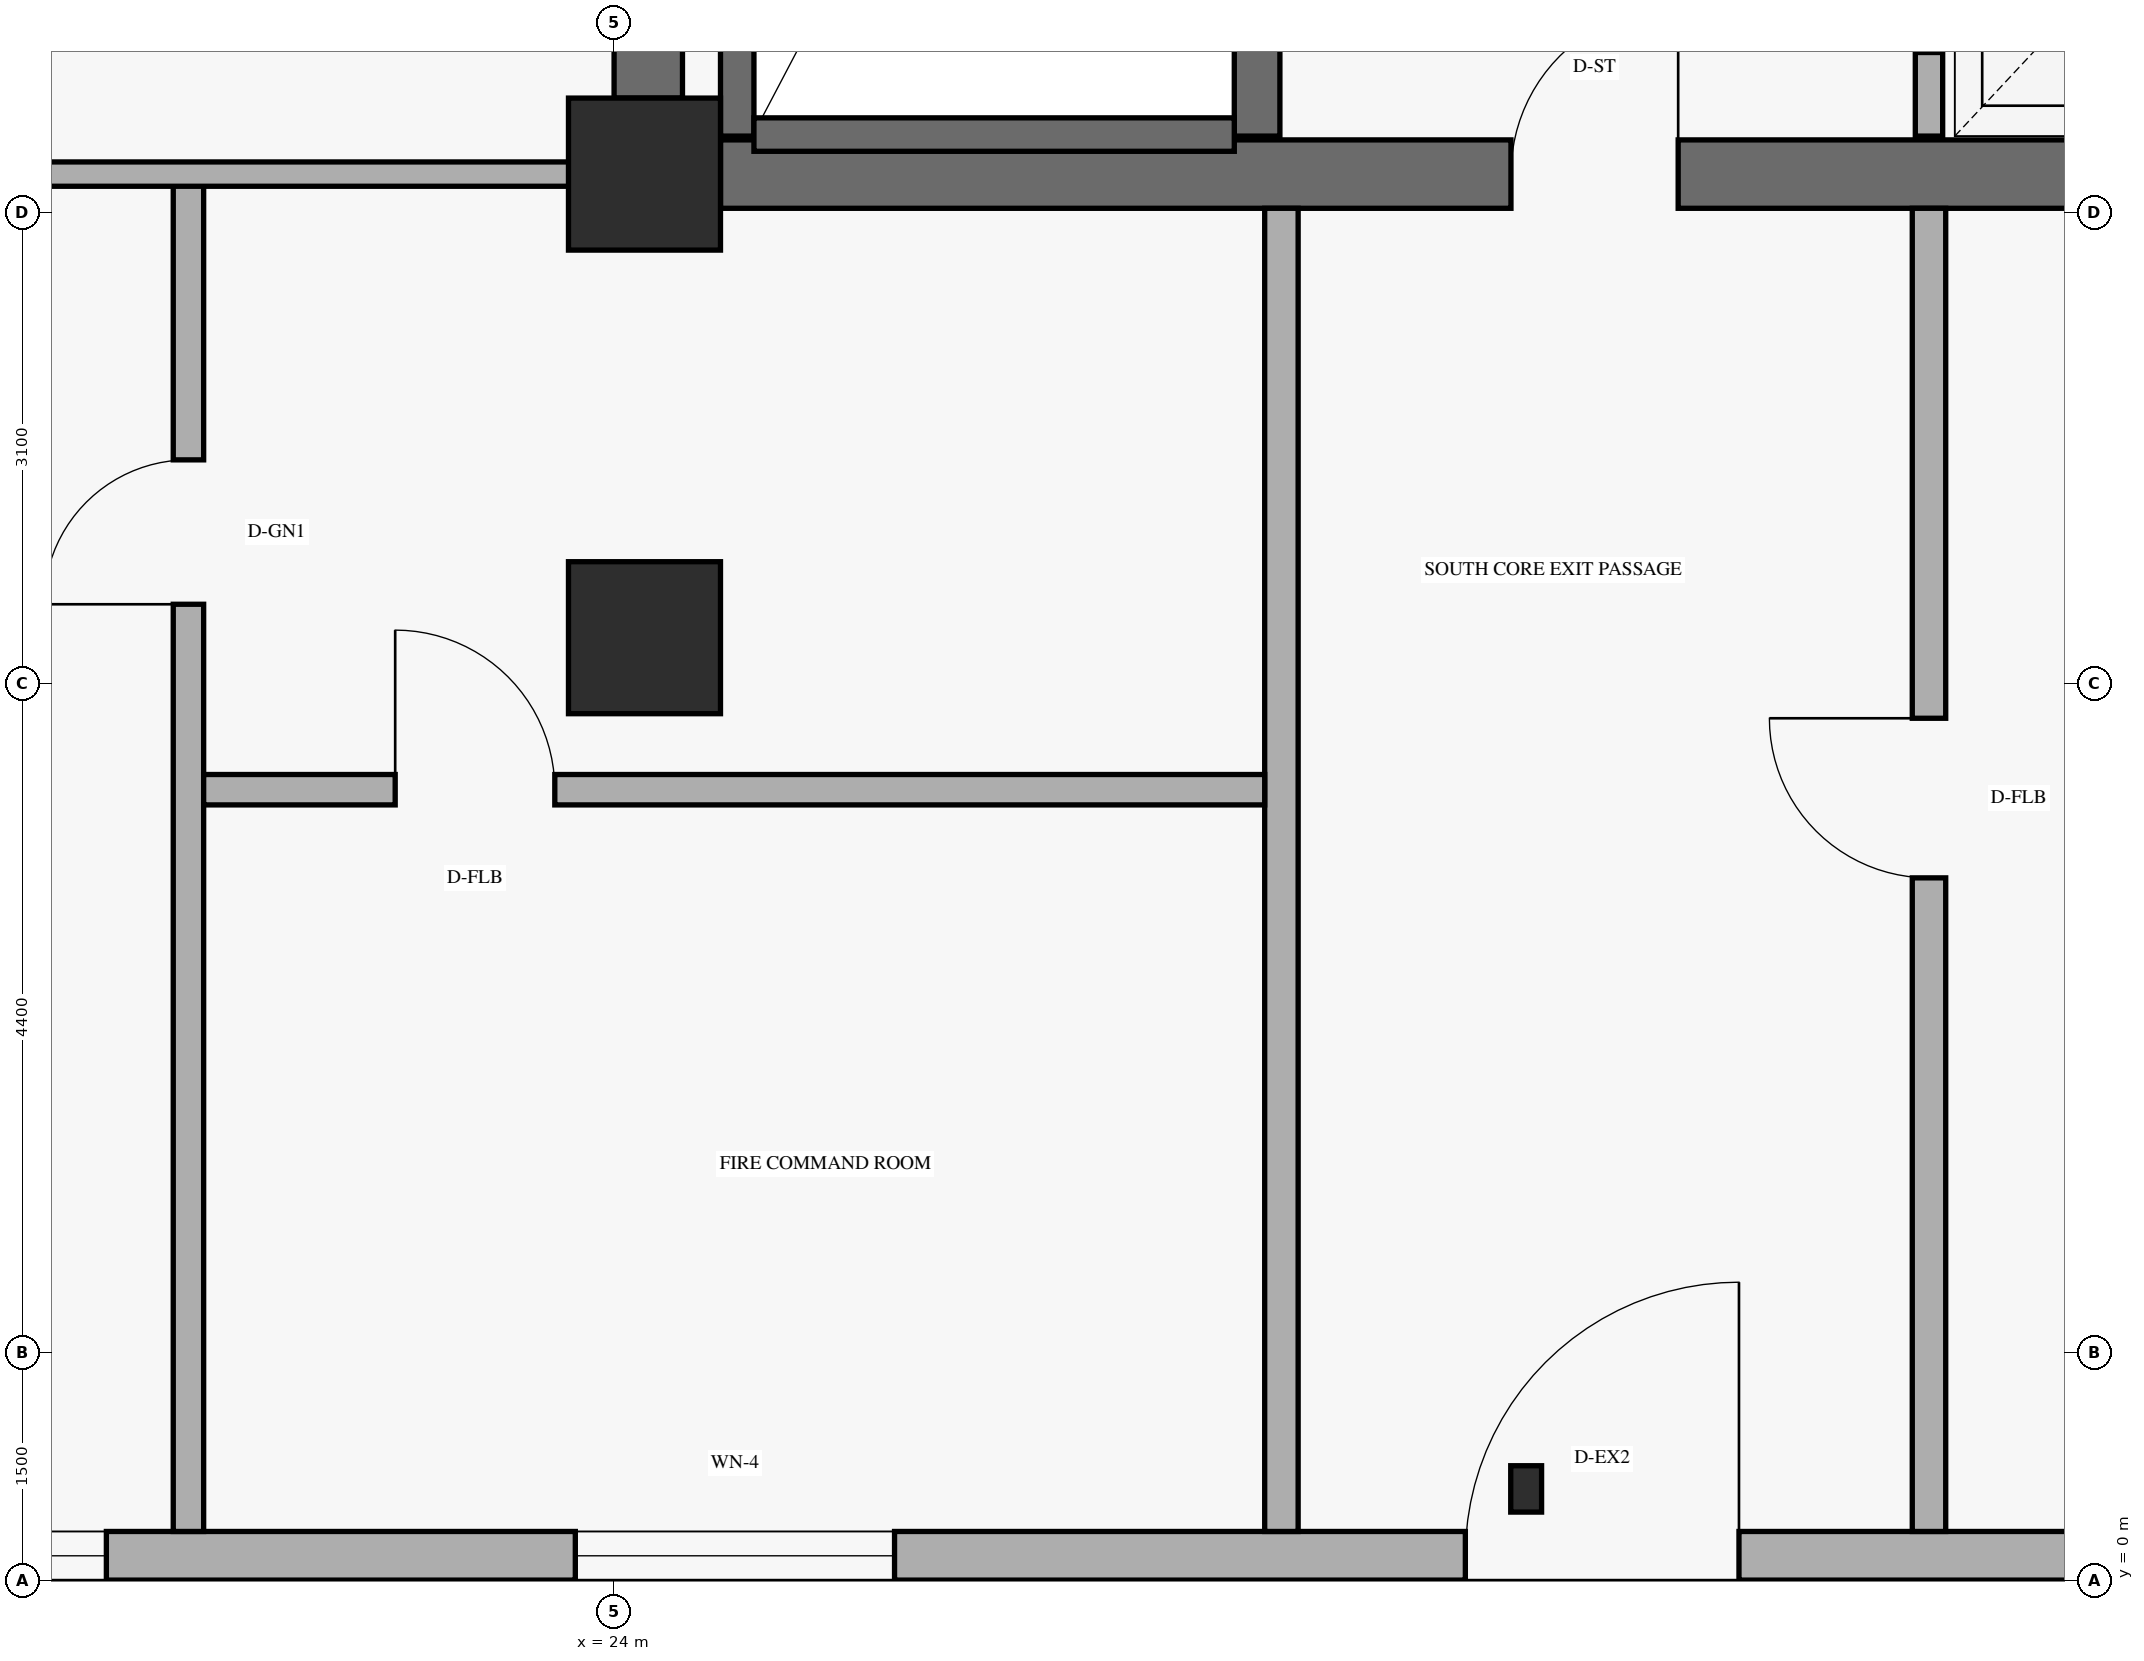
"""IFC4 building model, lengths in metres.
Left out: names, types, materials, properties, quantities, classifications, styles, units other than length and angle.
Written with IfcOpenShell. Run it as: python <this file> out.ifc"""

import sys

from ifc_helpers import new_model, si_unit, direction, frame, frame_2d, origin, origin_2d, place, context, subcontext, project, spatial, rectangle, hollow_rectangle, extrude, element, fill, save


model = new_model("IFC4")
c1 = context("Model", 3, precision=1e-05, world=origin(), true_north=direction((0.0, 1.0)))
c2 = subcontext(c1, "Body", "Model", "MODEL_VIEW")
j1 = project(units=[si_unit("LENGTHUNIT", "METRE"), si_unit("PLANEANGLEUNIT", "RADIAN")], contexts=[c1])
p1 = place(None, origin())
s1 = spatial("IfcSite", under=j1, at=p1, CompositionType="ELEMENT")
p2 = place(p1, origin())
s2 = spatial("IfcBuilding", under=s1, at=p2, CompositionType="ELEMENT")
p3 = place(p2, origin())
s3 = spatial("IfcBuildingStorey", under=s2, at=p3, CompositionType="ELEMENT", Elevation=0.0)
p4 = place(p3, frame((24.225, 9.75, 0.0), z_axis=(0.0, 0.0, 1.0), x_axis=(0.0, 1.0, 0.0)))
e1 = element("IfcWall", 1, at=p4, inside=s3, PredefinedType="SHEAR", context=c2, shape_type="SweptSolid", body=[
    extrude(rectangle(XDim=7.3, YDim=0.45, at=frame_2d((3.65, 0.0))), origin(), (0.0, 0.0, 1.0), 3.539),
])
p5 = place(p3, frame((24.7, 9.25, 0.0), z_axis=(0.0, 0.0, 1.0), x_axis=(1.0, 0.0, 0.0)))
e2 = element("IfcWall", 2, at=p5, inside=s3, PredefinedType="SHEAR", context=c2, shape_type="SweptSolid", body=[
    extrude(rectangle(XDim=10.0, YDim=0.45, at=frame_2d((5.0, 0.0))), origin(), (0.0, 0.0, 1.0), 4.39),
])
p6 = place(p5, frame((5.2, 0.0, 0.0)))
e3 = element("IfcOpeningElement", 3, at=p6, cuts=e2, PredefinedType="OPENING", context=c2, shape_type="SweptSolid", body=[
    extrude(rectangle(XDim=1.1, YDim=2.15, at=frame_2d((0.55, 1.075))), frame((0.0, 0.235, 0.0), z_axis=(0.0, -1.0, 0.0), x_axis=(1.0, 0.0, 0.0)), (0.0, 0.0, 1.0), 0.47),
])
p7 = place(p3, frame((24.81, 9.5, 0.0), z_axis=(0.0, 0.0, 1.0), x_axis=(0.0, 1.0, 0.0)))
e4 = element("IfcWall", 4, at=p7, inside=s3, PredefinedType="SHEAR", context=c2, shape_type="SweptSolid", body=[
    extrude(rectangle(XDim=7.76, YDim=0.22, at=frame_2d((3.88, 0.0))), origin(), (0.0, 0.0, 1.0), 4.39),
])
p8 = place(p3, frame((28.23, 9.5, 0.0), z_axis=(0.0, 0.0, 1.0), x_axis=(0.0, 1.0, 0.0)))
e5 = element("IfcWall", 5, at=p8, inside=s3, PredefinedType="SHEAR", context=c2, shape_type="SweptSolid", body=[
    extrude(rectangle(XDim=7.76, YDim=0.3, at=frame_2d((3.88, 0.0))), origin(), (0.0, 0.0, 1.0), 4.39),
])
p9 = place(p3, frame((24.92, 9.51, 0.0), z_axis=(0.0, 0.0, 1.0), x_axis=(1.0, 0.0, 0.0)))
e6 = element("IfcWall", 6, at=p9, inside=s3, PredefinedType="SHEAR", context=c2, shape_type="SweptSolid", body=[
    extrude(rectangle(XDim=3.16, YDim=0.22, at=frame_2d((1.58, 0.0))), origin(), (0.0, 0.0, 1.0), 4.39),
])
for number, where, z_axis, x_axis in (
    (7, (24.2, 6.2, 0.0), (0.0, 0.0, 1.0), (1.0, 0.0, 0.0)),
    (8, (24.2, 9.25, 0.0), (0.0, 0.0, 1.0), (1.0, 0.0, 0.0)),
):
    element("IfcColumn", number, at=place(p3, frame(where, z_axis=z_axis, x_axis=x_axis)), inside=s3, PredefinedType="COLUMN", context=c2, shape_type="SweptSolid", body=[
        extrude(rectangle(XDim=1.0, YDim=1.0, at=origin_2d()), origin(), (0.0, 0.0, 1.0), 4.8),
    ])
p10 = place(p3, frame((30.0, 0.6, 0.0), z_axis=(0.0, 0.0, 1.0), x_axis=(1.0, 0.0, 0.0)))
e9 = element("IfcColumn", 9, at=p10, inside=s3, PredefinedType="PILASTER", context=c2, shape_type="SweptSolid", body=[
    extrude(hollow_rectangle(XDim=0.203, YDim=0.305, WallThickness=0.013, at=origin_2d()), origin(), (0.0, 0.0, 1.0), 4.39),
])
p11 = place(p3, frame((0.0, 0.16, 0.0), z_axis=(0.0, 0.0, 1.0), x_axis=(1.0, 0.0, 0.0)))
e10 = element("IfcWall", 10, at=p11, inside=s3, PredefinedType="SOLIDWALL", context=c2, shape_type="SweptSolid", body=[
    extrude(rectangle(XDim=56.0, YDim=0.32, at=frame_2d((28.0, 0.0))), origin(), (0.0, 0.0, 1.0), 4.39),
])
p12 = place(p11, frame((8.85, 0.0, 0.0)))
e11 = element("IfcOpeningElement", 11, at=p12, cuts=e10, PredefinedType="OPENING", context=c2, shape_type="SweptSolid", body=[
    extrude(rectangle(XDim=1.8, YDim=2.25, at=frame_2d((0.9, 1.125))), frame((0.0, 0.17, 0.0), z_axis=(0.0, -1.0, 0.0), x_axis=(1.0, 0.0, 0.0)), (0.0, 0.0, 1.0), 0.34),
])
p13 = place(p11, frame((15.2, 0.0, 0.0)))
e12 = element("IfcOpeningElement", 12, at=p13, cuts=e10, PredefinedType="OPENING", context=c2, shape_type="SweptSolid", body=[
    extrude(rectangle(XDim=2.0, YDim=2.35, at=frame_2d((1.0, 1.175))), frame((0.0, 0.17, 0.0), z_axis=(0.0, -1.0, 0.0), x_axis=(1.0, 0.0, 0.0)), (0.0, 0.0, 1.0), 0.34),
])
p14 = place(p11, frame((29.6, 0.0, 0.0)))
e13 = element("IfcOpeningElement", 13, at=p14, cuts=e10, PredefinedType="OPENING", context=c2, shape_type="SweptSolid", body=[
    extrude(rectangle(XDim=1.8, YDim=2.25, at=frame_2d((0.9, 1.125))), frame((0.0, 0.17, 0.0), z_axis=(0.0, -1.0, 0.0), x_axis=(1.0, 0.0, 0.0)), (0.0, 0.0, 1.0), 0.34),
])
p15 = place(p11, frame((3.04, 0.0, 0.85)))
e14 = element("IfcOpeningElement", 14, at=p15, cuts=e10, PredefinedType="OPENING", context=c2, shape_type="SweptSolid", body=[
    extrude(rectangle(XDim=2.1, YDim=1.75, at=frame_2d((1.05, 0.875))), frame((0.0, 0.17, 0.0), z_axis=(0.0, -1.0, 0.0), x_axis=(1.0, 0.0, 0.0)), (0.0, 0.0, 1.0), 0.34),
])
p16 = place(p11, frame((18.56, 0.0, 0.85)))
e15 = element("IfcOpeningElement", 15, at=p16, cuts=e10, PredefinedType="OPENING", context=c2, shape_type="SweptSolid", body=[
    extrude(rectangle(XDim=2.1, YDim=1.75, at=frame_2d((1.05, 0.875))), frame((0.0, 0.17, 0.0), z_axis=(0.0, -1.0, 0.0), x_axis=(1.0, 0.0, 0.0)), (0.0, 0.0, 1.0), 0.34),
])
p17 = place(p11, frame((23.745, 0.0, 0.85)))
e16 = element("IfcOpeningElement", 16, at=p17, cuts=e10, PredefinedType="OPENING", context=c2, shape_type="SweptSolid", body=[
    extrude(rectangle(XDim=2.1, YDim=1.75, at=frame_2d((1.05, 0.875))), frame((0.0, 0.17, 0.0), z_axis=(0.0, -1.0, 0.0), x_axis=(1.0, 0.0, 0.0)), (0.0, 0.0, 1.0), 0.34),
])
p18 = place(p11, frame((37.275, 0.0, 0.85)))
e17 = element("IfcOpeningElement", 17, at=p18, cuts=e10, PredefinedType="OPENING", context=c2, shape_type="SweptSolid", body=[
    extrude(rectangle(XDim=2.1, YDim=1.75, at=frame_2d((1.05, 0.875))), frame((0.0, 0.17, 0.0), z_axis=(0.0, -1.0, 0.0), x_axis=(1.0, 0.0, 0.0)), (0.0, 0.0, 1.0), 0.34),
])
p19 = place(p11, frame((48.95, 0.0, 0.85)))
e18 = element("IfcOpeningElement", 18, at=p19, cuts=e10, PredefinedType="OPENING", context=c2, shape_type="SweptSolid", body=[
    extrude(rectangle(XDim=2.1, YDim=1.75, at=frame_2d((1.05, 0.875))), frame((0.0, 0.17, 0.0), z_axis=(0.0, -1.0, 0.0), x_axis=(1.0, 0.0, 0.0)), (0.0, 0.0, 1.0), 0.34),
])
p20 = place(p3, frame((32.65, 9.5, 0.0), z_axis=(0.0, 0.0, 1.0), x_axis=(0.0, 1.0, 0.0)))
e19 = element("IfcWall", 19, at=p20, inside=s3, PredefinedType="STANDARD", context=c2, shape_type="SweptSolid", body=[
    extrude(rectangle(XDim=5.98, YDim=0.18, at=frame_2d((2.99, 0.0))), origin(), (0.0, 0.0, 1.0), 4.39),
])
p21 = place(p20, frame((0.55, 0.0, 0.0)))
e20 = element("IfcOpeningElement", 20, at=p21, cuts=e19, PredefinedType="OPENING", context=c2, shape_type="SweptSolid", body=[
    extrude(rectangle(XDim=1.05, YDim=2.2, at=frame_2d((0.525, 1.1))), frame((0.0, 0.1, 0.0), z_axis=(0.0, -1.0, 0.0), x_axis=(1.0, 0.0, 0.0)), (0.0, 0.0, 1.0), 0.2),
])
p22 = place(p20, frame((2.55, 0.0, 0.0)))
e21 = element("IfcOpeningElement", 21, at=p22, cuts=e19, PredefinedType="OPENING", context=c2, shape_type="SweptSolid", body=[
    extrude(rectangle(XDim=1.05, YDim=2.2, at=frame_2d((0.525, 1.1))), frame((0.0, 0.1, 0.0), z_axis=(0.0, -1.0, 0.0), x_axis=(1.0, 0.0, 0.0)), (0.0, 0.0, 1.0), 0.2),
])
p23 = place(p20, frame((4.55, 0.0, 0.0)))
e22 = element("IfcOpeningElement", 22, at=p23, cuts=e19, PredefinedType="OPENING", context=c2, shape_type="SweptSolid", body=[
    extrude(rectangle(XDim=1.05, YDim=2.2, at=frame_2d((0.525, 1.1))), frame((0.0, 0.1, 0.0), z_axis=(0.0, -1.0, 0.0), x_axis=(1.0, 0.0, 0.0)), (0.0, 0.0, 1.0), 0.2),
])
p24 = place(p3, frame((28.39, 0.32, 0.0), z_axis=(0.0, 0.0, 1.0), x_axis=(0.0, 1.0, 0.0)))
e23 = element("IfcWall", 23, at=p24, inside=s3, PredefinedType="STANDARD", context=c2, shape_type="SweptSolid", body=[
    extrude(rectangle(XDim=8.705, YDim=0.22, at=frame_2d((4.353, 0.0))), origin(), (0.0, 0.0, 1.0), 3.761),
])
p25 = place(p3, frame((32.65, 0.32, 0.0), z_axis=(0.0, 0.0, 1.0), x_axis=(0.0, 1.0, 0.0)))
e24 = element("IfcWall", 24, at=p25, inside=s3, PredefinedType="STANDARD", context=c2, shape_type="SweptSolid", body=[
    extrude(rectangle(XDim=8.705, YDim=0.22, at=frame_2d((4.353, 0.0))), origin(), (0.0, 0.0, 1.0), 3.761),
])
p26 = place(p25, frame((4.3, 0.0, 0.0)))
e25 = element("IfcOpeningElement", 25, at=p26, cuts=e24, PredefinedType="OPENING", context=c2, shape_type="SweptSolid", body=[
    extrude(rectangle(XDim=1.05, YDim=2.15, at=frame_2d((0.525, 1.075))), frame((0.0, 0.12, 0.0), z_axis=(0.0, -1.0, 0.0), x_axis=(1.0, 0.0, 0.0)), (0.0, 0.0, 1.0), 0.24),
])
p27 = place(p3, frame((21.2, 0.32, 0.0), z_axis=(0.0, 0.0, 1.0), x_axis=(0.0, 1.0, 0.0)))
e26 = element("IfcWall", 26, at=p27, inside=s3, PredefinedType="STANDARD", context=c2, shape_type="SweptSolid", body=[
    extrude(rectangle(XDim=8.93, YDim=0.2, at=frame_2d((4.465, 0.0))), origin(), (0.0, 0.0, 1.0), 3.272),
])
p28 = place(p27, frame((6.1, 0.0, 0.0)))
e27 = element("IfcOpeningElement", 27, at=p28, cuts=e26, PredefinedType="OPENING", context=c2, shape_type="SweptSolid", body=[
    extrude(rectangle(XDim=0.95, YDim=2.15, at=frame_2d((0.475, 1.075))), frame((0.0, 0.11, 0.0), z_axis=(0.0, -1.0, 0.0), x_axis=(1.0, 0.0, 0.0)), (0.0, 0.0, 1.0), 0.22),
])
p29 = place(p3, frame((21.3, 5.2, 0.0), z_axis=(0.0, 0.0, 1.0), x_axis=(1.0, 0.0, 0.0)))
e28 = element("IfcWall", 28, at=p29, inside=s3, PredefinedType="STANDARD", context=c2, shape_type="SweptSolid", body=[
    extrude(rectangle(XDim=6.98, YDim=0.2, at=frame_2d((3.49, 0.0))), origin(), (0.0, 0.0, 1.0), 4.39),
])
p30 = place(p29, frame((1.26, 0.0, 0.0)))
e29 = element("IfcOpeningElement", 29, at=p30, cuts=e28, PredefinedType="OPENING", context=c2, shape_type="SweptSolid", body=[
    extrude(rectangle(XDim=1.05, YDim=2.15, at=frame_2d((0.525, 1.075))), frame((0.0, 0.11, 0.0), z_axis=(0.0, -1.0, 0.0), x_axis=(1.0, 0.0, 0.0)), (0.0, 0.0, 1.0), 0.22),
])
p31 = place(p3, frame((11.2, 9.25, 0.0), z_axis=(0.0, 0.0, 1.0), x_axis=(1.0, 0.0, 0.0)))
e30 = element("IfcWall", 30, at=p31, inside=s3, PredefinedType="PARTITIONING", context=c2, shape_type="SweptSolid", body=[
    extrude(rectangle(XDim=12.8, YDim=0.16, at=frame_2d((6.4, 0.0))), origin(), (0.0, 0.0, 1.0), 3.272),
])
p32 = place(p31, frame((7.77, 0.0, 0.0)))
e31 = element("IfcOpeningElement", 31, at=p32, cuts=e30, PredefinedType="OPENING", context=c2, shape_type="SweptSolid", body=[
    extrude(rectangle(XDim=1.15, YDim=2.15, at=frame_2d((0.575, 1.075))), frame((0.0, 0.09, 0.0), z_axis=(0.0, -1.0, 0.0), x_axis=(1.0, 0.0, 0.0)), (0.0, 0.0, 1.0), 0.18),
])
p33 = place(p14, frame((1.8, 0.0, 0.0), z_axis=(0.0, 0.0, 1.0), x_axis=(-1.0, 0.0, 0.0)))
e32 = element("IfcDoor", 32, at=p33, inside=s3, OperationType="SINGLE_SWING_LEFT", PredefinedType="DOOR", context=c2, shape_type="SweptSolid", body=[
    extrude(rectangle(XDim=1.8, YDim=2.25, at=frame_2d((0.9, 1.125))), frame((0.0, 0.025, 0.0), z_axis=(0.0, -1.0, 0.0), x_axis=(1.0, 0.0, 0.0)), (0.0, 0.0, 1.0), 0.05),
])
fill(e13, e32)
p34 = place(p16, origin())
e33 = element("IfcWindow", 33, at=p34, inside=s3, PartitioningType="SINGLE_PANEL", PredefinedType="WINDOW", context=c2, shape_type="SweptSolid", body=[
    extrude(rectangle(XDim=2.1, YDim=1.75, at=frame_2d((1.05, 0.875))), frame((0.0, 0.03, 0.0), z_axis=(0.0, -1.0, 0.0), x_axis=(1.0, 0.0, 0.0)), (0.0, 0.0, 1.0), 0.06),
])
fill(e15, e33)
p35 = place(p17, origin())
e34 = element("IfcWindow", 34, at=p35, inside=s3, PartitioningType="SINGLE_PANEL", PredefinedType="WINDOW", context=c2, shape_type="SweptSolid", body=[
    extrude(rectangle(XDim=2.1, YDim=1.75, at=frame_2d((1.05, 0.875))), frame((0.0, 0.03, 0.0), z_axis=(0.0, -1.0, 0.0), x_axis=(1.0, 0.0, 0.0)), (0.0, 0.0, 1.0), 0.06),
])
fill(e16, e34)
p36 = place(p21, origin())
e35 = element("IfcDoor", 35, at=p36, inside=s3, OperationType="SLIDING_TO_LEFT", PredefinedType="DOOR", context=c2, shape_type="SweptSolid", body=[
    extrude(rectangle(XDim=1.05, YDim=2.2, at=frame_2d((0.525, 1.1))), frame((0.0, 0.025, 0.0), z_axis=(0.0, -1.0, 0.0), x_axis=(1.0, 0.0, 0.0)), (0.0, 0.0, 1.0), 0.05),
])
fill(e20, e35)
p37 = place(p6, frame((1.1, 0.0, 0.0), z_axis=(0.0, 0.0, 1.0), x_axis=(-1.0, 0.0, 0.0)))
e36 = element("IfcDoor", 36, at=p37, inside=s3, OperationType="SINGLE_SWING_LEFT", PredefinedType="DOOR", context=c2, shape_type="SweptSolid", body=[
    extrude(rectangle(XDim=1.1, YDim=2.15, at=frame_2d((0.55, 1.075))), frame((0.0, 0.025, 0.0), z_axis=(0.0, -1.0, 0.0), x_axis=(1.0, 0.0, 0.0)), (0.0, 0.0, 1.0), 0.05),
])
fill(e3, e36)
p38 = place(p26, origin())
e37 = element("IfcDoor", 37, at=p38, inside=s3, OperationType="SINGLE_SWING_RIGHT", PredefinedType="DOOR", context=c2, shape_type="SweptSolid", body=[
    extrude(rectangle(XDim=1.05, YDim=2.15, at=frame_2d((0.525, 1.075))), frame((0.0, 0.025, 0.0), z_axis=(0.0, -1.0, 0.0), x_axis=(1.0, 0.0, 0.0)), (0.0, 0.0, 1.0), 0.05),
])
fill(e25, e37)
p39 = place(p30, origin())
e38 = element("IfcDoor", 38, at=p39, inside=s3, OperationType="SINGLE_SWING_LEFT", PredefinedType="DOOR", context=c2, shape_type="SweptSolid", body=[
    extrude(rectangle(XDim=1.05, YDim=2.15, at=frame_2d((0.525, 1.075))), frame((0.0, 0.025, 0.0), z_axis=(0.0, -1.0, 0.0), x_axis=(1.0, 0.0, 0.0)), (0.0, 0.0, 1.0), 0.05),
])
fill(e29, e38)
p40 = place(p28, origin())
e39 = element("IfcDoor", 39, at=p40, inside=s3, OperationType="SINGLE_SWING_LEFT", PredefinedType="DOOR", context=c2, shape_type="SweptSolid", body=[
    extrude(rectangle(XDim=0.95, YDim=2.15, at=frame_2d((0.475, 1.075))), frame((0.0, 0.025, 0.0), z_axis=(0.0, -1.0, 0.0), x_axis=(1.0, 0.0, 0.0)), (0.0, 0.0, 1.0), 0.05),
])
fill(e27, e39)
save(model, sys.argv[1])
